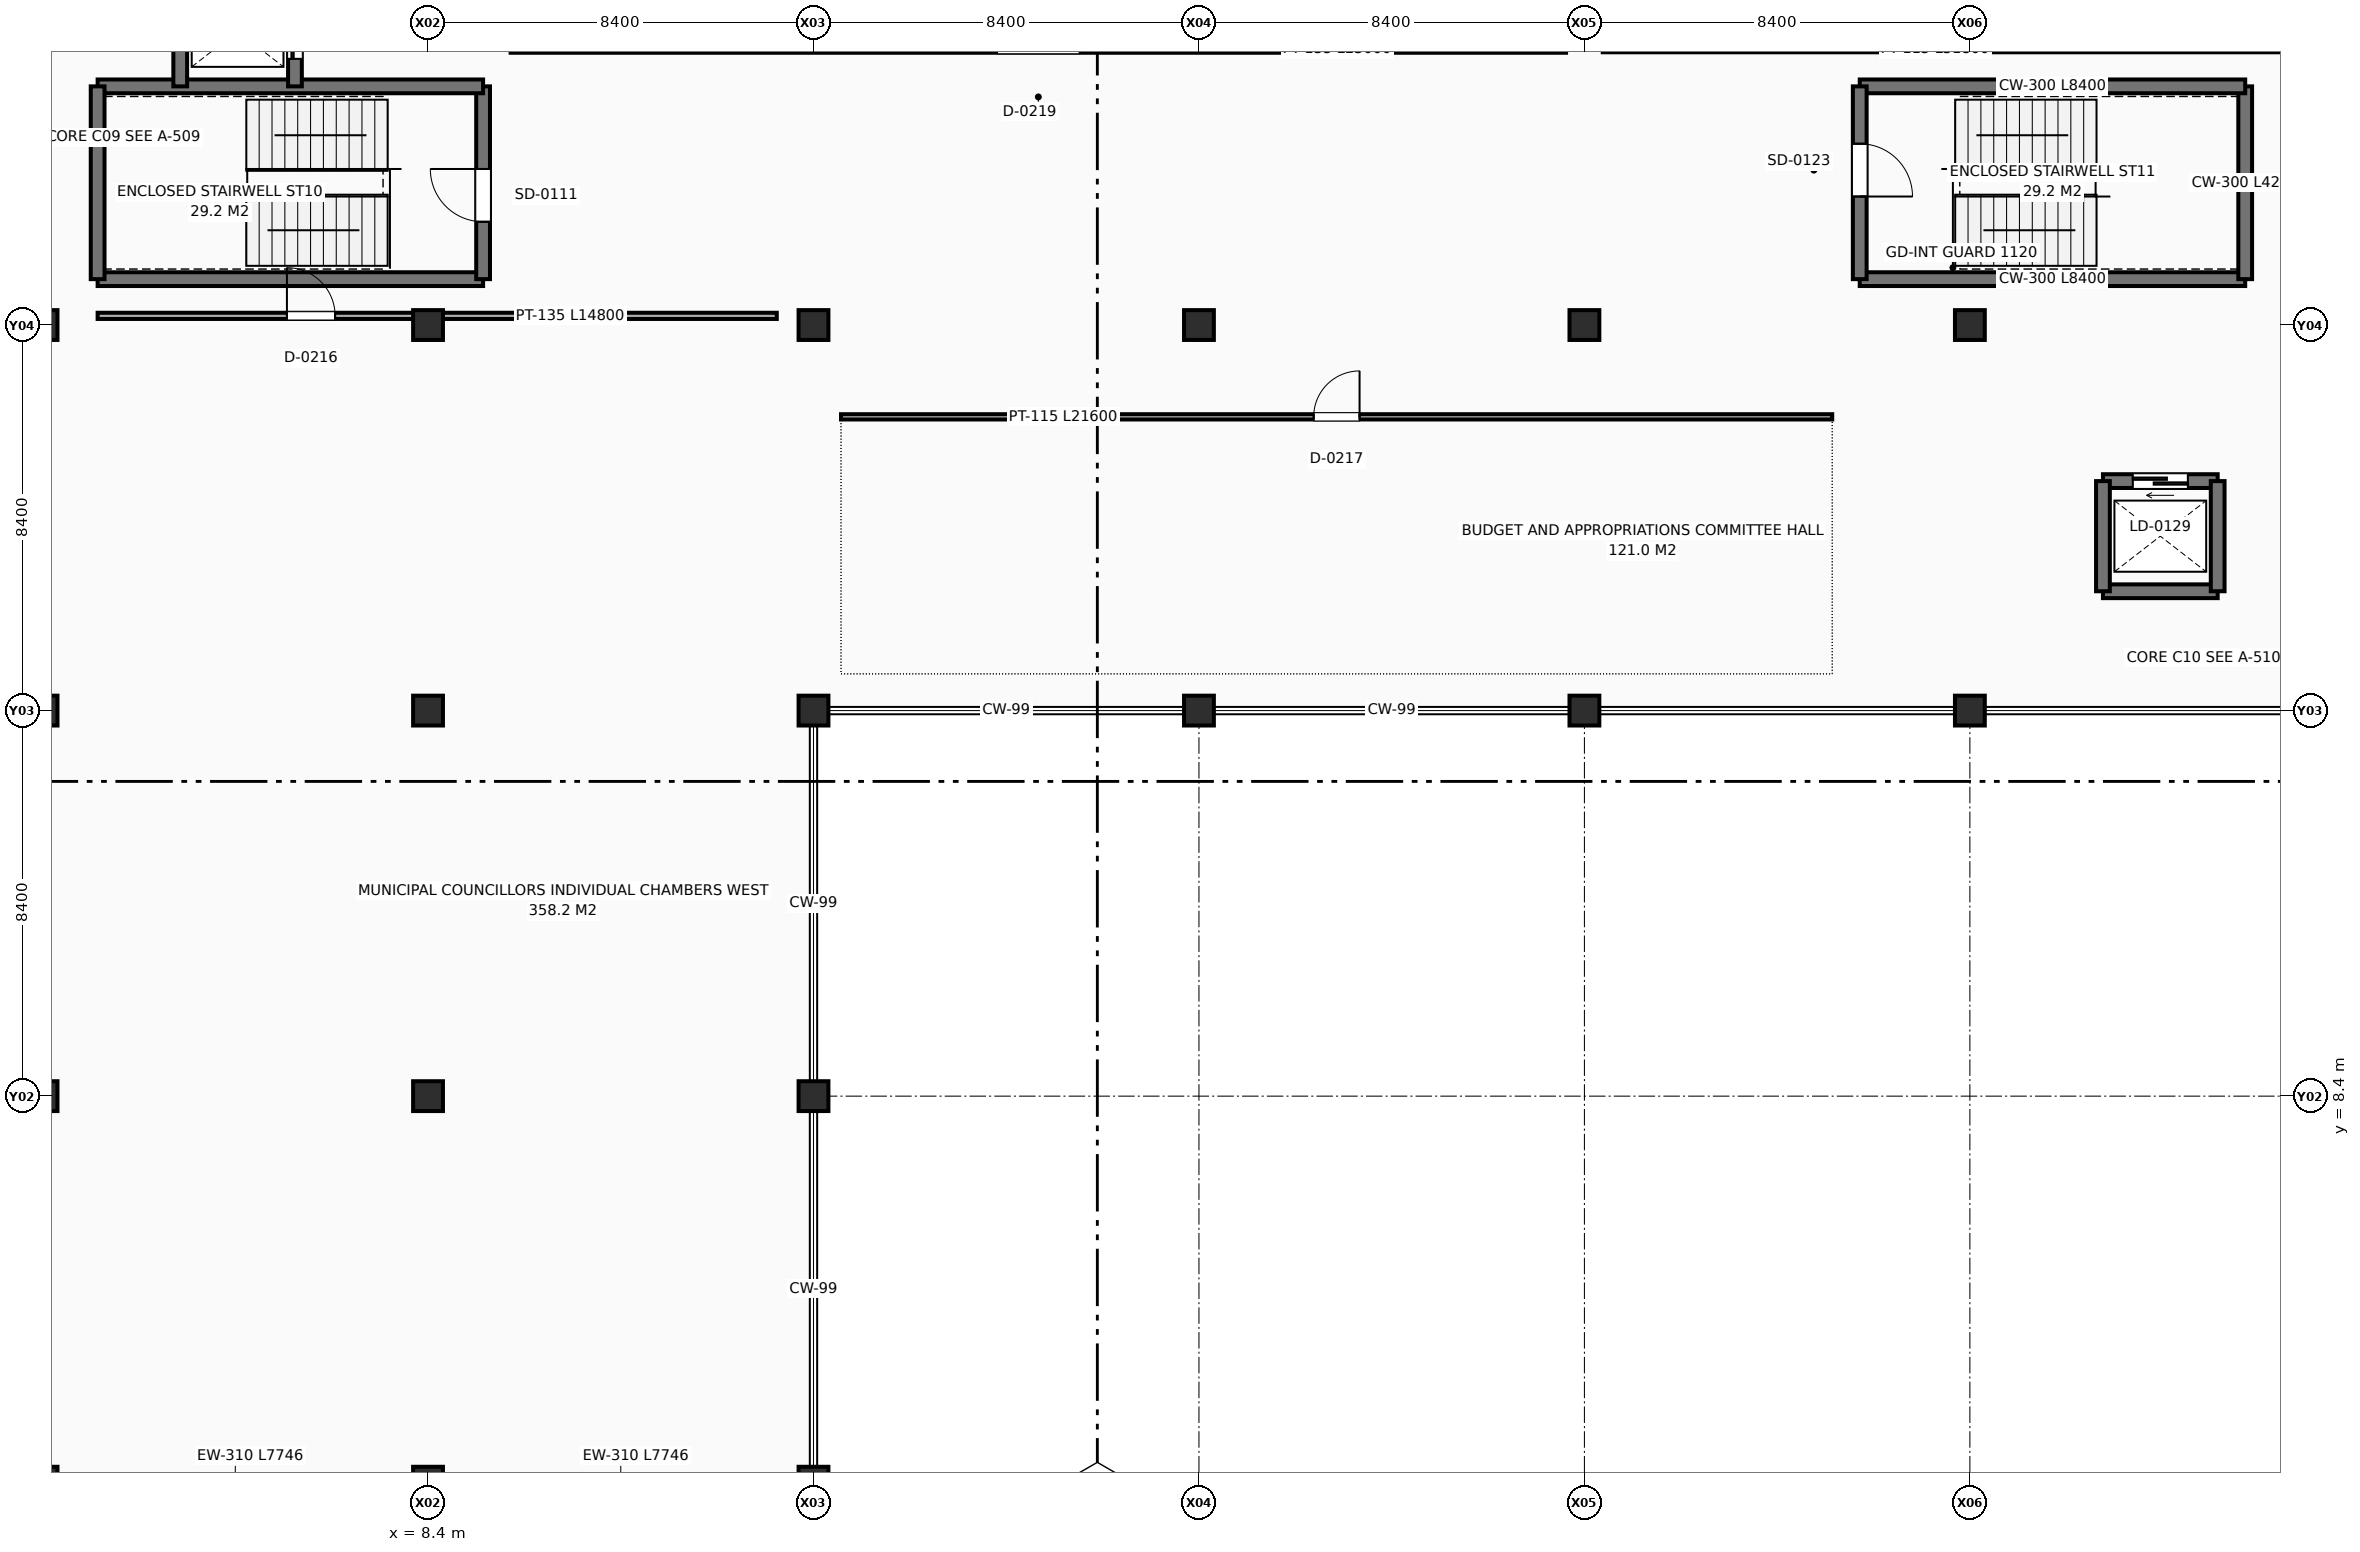
"""IFC4 building model, lengths in metres.
Left out: names, types, materials, properties, quantities, classifications, styles, units other than length and angle.
Written with IfcOpenShell. Run it as: python <this file> out.ifc"""

import sys

from ifc_helpers import new_model, si_unit, direction, frame, frame_2d, origin, origin_2d, place, context, subcontext, project, spatial, rectangle, extrude, element, fill, save


model = new_model("IFC4")
c1 = context("Model", 3, precision=1e-05, world=origin(), true_north=direction((0.0, 1.0)))
c2 = subcontext(c1, "Body", "Model", "MODEL_VIEW")
j1 = project(units=[si_unit("LENGTHUNIT", "METRE"), si_unit("PLANEANGLEUNIT", "RADIAN")], contexts=[c1])
p1 = place(None, origin())
s1 = spatial("IfcSite", under=j1, at=p1, CompositionType="ELEMENT")
p2 = place(p1, origin())
s2 = spatial("IfcBuilding", under=s1, at=p2, CompositionType="ELEMENT")
p3 = place(p2, frame((0.0, 0.0, 9.6)))
s3 = spatial("IfcBuildingStorey", under=s2, at=p3, CompositionType="ELEMENT", Elevation=9.6)
for number, where, z_axis, x_axis in (
    (1, (0.0, 0.0, 0.0), (0.0, 0.0, 1.0), (1.0, 0.0, 0.0)),
    (2, (0.0, 8.4, 0.0), (0.0, 0.0, 1.0), (1.0, 0.0, 0.0)),
    (3, (0.0, 16.8, 0.0), (0.0, 0.0, 1.0), (1.0, 0.0, 0.0)),
    (4, (0.0, 25.2, 0.0), (0.0, 0.0, 1.0), (1.0, 0.0, 0.0)),
    (5, (8.4, 0.0, 0.0), (0.0, 0.0, 1.0), (1.0, 0.0, 0.0)),
    (6, (8.4, 8.4, 0.0), (0.0, 0.0, 1.0), (1.0, 0.0, 0.0)),
    (7, (8.4, 16.8, 0.0), (0.0, 0.0, 1.0), (1.0, 0.0, 0.0)),
    (8, (8.4, 25.2, 0.0), (0.0, 0.0, 1.0), (1.0, 0.0, 0.0)),
    (9, (16.8, 0.0, 0.0), (0.0, 0.0, 1.0), (1.0, 0.0, 0.0)),
    (10, (16.8, 8.4, 0.0), (0.0, 0.0, 1.0), (1.0, 0.0, 0.0)),
    (11, (16.8, 16.8, 0.0), (0.0, 0.0, 1.0), (1.0, 0.0, 0.0)),
    (12, (16.8, 25.2, 0.0), (0.0, 0.0, 1.0), (1.0, 0.0, 0.0)),
    (13, (25.2, 16.8, 0.0), (0.0, 0.0, 1.0), (1.0, 0.0, 0.0)),
    (14, (25.2, 25.2, 0.0), (0.0, 0.0, 1.0), (1.0, 0.0, 0.0)),
    (15, (33.6, 16.8, 0.0), (0.0, 0.0, 1.0), (1.0, 0.0, 0.0)),
    (16, (33.6, 25.2, 0.0), (0.0, 0.0, 1.0), (1.0, 0.0, 0.0)),
    (17, (42.0, 16.8, 0.0), (0.0, 0.0, 1.0), (1.0, 0.0, 0.0)),
    (18, (42.0, 25.2, 0.0), (0.0, 0.0, 1.0), (1.0, 0.0, 0.0)),
):
    element("IfcColumn", number, at=place(p3, frame(where, z_axis=z_axis, x_axis=x_axis)), inside=s3, PredefinedType="COLUMN", context=c2, shape_type="SweptSolid", body=[
        extrude(rectangle(XDim=0.65, YDim=0.65, at=origin_2d()), origin(), (0.0, 0.0, 1.0), 4.2),
    ])
p4 = place(p3, frame((1.2, 26.2, 0.0), z_axis=(0.0, 0.0, 1.0), x_axis=(1.0, 0.0, 0.0)))
e19 = element("IfcWall", 19, at=p4, inside=s3, PredefinedType="SHEAR", context=c2, shape_type="SweptSolid", body=[
    extrude(rectangle(XDim=8.4, YDim=0.3, at=frame_2d((4.2, 0.0))), origin(), (0.0, 0.0, 1.0), 3.92),
])
p5 = place(p3, frame((9.6, 26.2, 0.0), z_axis=(0.0, 0.0, 1.0), x_axis=(0.0, 1.0, 0.0)))
e20 = element("IfcWall", 20, at=p5, inside=s3, PredefinedType="SHEAR", context=c2, shape_type="SweptSolid", body=[
    extrude(rectangle(XDim=4.2, YDim=0.3, at=frame_2d((2.1, 0.0))), origin(), (0.0, 0.0, 1.0), 3.92),
])
p6 = place(p5, frame((1.25, 0.0, 0.0)))
e21 = element("IfcOpeningElement", 21, at=p6, cuts=e20, PredefinedType="OPENING", context=c2, shape_type="SweptSolid", body=[
    extrude(rectangle(XDim=1.15, YDim=2.2, at=frame_2d((0.575, 1.1))), frame((0.0, 0.16, 0.0), z_axis=(0.0, -1.0, 0.0), x_axis=(1.0, 0.0, 0.0)), (0.0, 0.0, 1.0), 0.32),
])
p7 = place(p3, frame((9.6, 30.4, 0.0), z_axis=(0.0, 0.0, 1.0), x_axis=(-1.0, 0.0, 0.0)))
e22 = element("IfcWall", 22, at=p7, inside=s3, PredefinedType="SHEAR", context=c2, shape_type="SweptSolid", body=[
    extrude(rectangle(XDim=8.4, YDim=0.3, at=frame_2d((4.2, 0.0))), origin(), (0.0, 0.0, 1.0), 3.92),
])
p8 = place(p3, frame((1.2, 30.4, 0.0), z_axis=(0.0, 0.0, 1.0), x_axis=(0.0, -1.0, 0.0)))
e23 = element("IfcWall", 23, at=p8, inside=s3, PredefinedType="SHEAR", context=c2, shape_type="SweptSolid", body=[
    extrude(rectangle(XDim=4.2, YDim=0.3, at=frame_2d((2.1, 0.0))), origin(), (0.0, 0.0, 1.0), 3.92),
])
p9 = place(p3, frame((3.0, 32.8, 0.0), z_axis=(0.0, 0.0, 1.0), x_axis=(0.0, -1.0, 0.0)))
e24 = element("IfcWall", 24, at=p9, inside=s3, PredefinedType="SHEAR", context=c2, shape_type="SweptSolid", body=[
    extrude(rectangle(XDim=2.4, YDim=0.3, at=frame_2d((1.2, 0.0))), origin(), (0.0, 0.0, 1.0), 3.92),
])
p10 = place(p3, frame((5.5, 30.4, 0.0), z_axis=(0.0, 0.0, 1.0), x_axis=(0.0, 1.0, 0.0)))
e25 = element("IfcWall", 25, at=p10, inside=s3, PredefinedType="SHEAR", context=c2, shape_type="SweptSolid", body=[
    extrude(rectangle(XDim=2.4, YDim=0.3, at=frame_2d((1.2, 0.0))), origin(), (0.0, 0.0, 1.0), 3.92),
])
p11 = place(p10, frame((0.6, 0.0, 0.0)))
e26 = element("IfcOpeningElement", 26, at=p11, cuts=e25, PredefinedType="OPENING", context=c2, shape_type="SweptSolid", body=[
    extrude(rectangle(XDim=1.2, YDim=2.25, at=frame_2d((0.6, 1.125))), frame((0.0, 0.16, 0.0), z_axis=(0.0, -1.0, 0.0), x_axis=(1.0, 0.0, 0.0)), (0.0, 0.0, 1.0), 0.32),
])
p12 = place(p3, frame((39.6, 26.2, 0.0), z_axis=(0.0, 0.0, 1.0), x_axis=(1.0, 0.0, 0.0)))
e27 = element("IfcWall", 27, at=p12, inside=s3, PredefinedType="SHEAR", context=c2, shape_type="SweptSolid", body=[
    extrude(rectangle(XDim=8.4, YDim=0.3, at=frame_2d((4.2, 0.0))), origin(), (0.0, 0.0, 1.0), 3.92),
])
p13 = place(p3, frame((48.0, 26.2, 0.0), z_axis=(0.0, 0.0, 1.0), x_axis=(0.0, 1.0, 0.0)))
e28 = element("IfcWall", 28, at=p13, inside=s3, PredefinedType="SHEAR", context=c2, shape_type="SweptSolid", body=[
    extrude(rectangle(XDim=4.2, YDim=0.3, at=frame_2d((2.1, 0.0))), origin(), (0.0, 0.0, 1.0), 3.92),
])
p14 = place(p3, frame((48.0, 30.4, 0.0), z_axis=(0.0, 0.0, 1.0), x_axis=(-1.0, 0.0, 0.0)))
e29 = element("IfcWall", 29, at=p14, inside=s3, PredefinedType="SHEAR", context=c2, shape_type="SweptSolid", body=[
    extrude(rectangle(XDim=8.4, YDim=0.3, at=frame_2d((4.2, 0.0))), origin(), (0.0, 0.0, 1.0), 3.92),
])
p15 = place(p3, frame((39.6, 30.4, 0.0), z_axis=(0.0, 0.0, 1.0), x_axis=(0.0, -1.0, 0.0)))
e30 = element("IfcWall", 30, at=p15, inside=s3, PredefinedType="SHEAR", context=c2, shape_type="SweptSolid", body=[
    extrude(rectangle(XDim=4.2, YDim=0.3, at=frame_2d((2.1, 0.0))), origin(), (0.0, 0.0, 1.0), 3.92),
])
p16 = place(p15, frame((1.25, 0.0, 0.0)))
e31 = element("IfcOpeningElement", 31, at=p16, cuts=e30, PredefinedType="OPENING", context=c2, shape_type="SweptSolid", body=[
    extrude(rectangle(XDim=1.15, YDim=2.2, at=frame_2d((0.575, 1.1))), frame((0.0, 0.16, 0.0), z_axis=(0.0, -1.0, 0.0), x_axis=(1.0, 0.0, 0.0)), (0.0, 0.0, 1.0), 0.32),
])
p17 = place(p3, frame((47.4, 21.8, 0.0), z_axis=(0.0, 0.0, 1.0), x_axis=(-1.0, 0.0, 0.0)))
e32 = element("IfcWall", 32, at=p17, inside=s3, PredefinedType="SHEAR", context=c2, shape_type="SweptSolid", body=[
    extrude(rectangle(XDim=2.5, YDim=0.3, at=frame_2d((1.25, 0.0))), origin(), (0.0, 0.0, 1.0), 3.92),
])
p18 = place(p17, frame((0.65, 0.0, 0.0)))
e33 = element("IfcOpeningElement", 33, at=p18, cuts=e32, PredefinedType="OPENING", context=c2, shape_type="SweptSolid", body=[
    extrude(rectangle(XDim=1.2, YDim=2.25, at=frame_2d((0.6, 1.125))), frame((0.0, 0.16, 0.0), z_axis=(0.0, -1.0, 0.0), x_axis=(1.0, 0.0, 0.0)), (0.0, 0.0, 1.0), 0.32),
])
p19 = place(p3, frame((44.9, 19.4, 0.0), z_axis=(0.0, 0.0, 1.0), x_axis=(1.0, 0.0, 0.0)))
e34 = element("IfcWall", 34, at=p19, inside=s3, PredefinedType="SHEAR", context=c2, shape_type="SweptSolid", body=[
    extrude(rectangle(XDim=2.5, YDim=0.3, at=frame_2d((1.25, 0.0))), origin(), (0.0, 0.0, 1.0), 3.92),
])
for number, where, z_axis, x_axis in (
    (35, (44.9, 21.8, 0.0), (0.0, 0.0, 1.0), (0.0, -1.0, 0.0)),
    (36, (47.4, 19.4, 0.0), (0.0, 0.0, 1.0), (0.0, 1.0, 0.0)),
):
    element("IfcWall", number, at=place(p3, frame(where, z_axis=z_axis, x_axis=x_axis)), inside=s3, PredefinedType="SHEAR", context=c2, shape_type="SweptSolid", body=[
        extrude(rectangle(XDim=2.4, YDim=0.3, at=frame_2d((1.2, 0.0))), origin(), (0.0, 0.0, 1.0), 3.92),
    ])
p20 = place(p3, frame((1.2, 25.4, 0.0), z_axis=(0.0, 0.0, 1.0), x_axis=(1.0, 0.0, 0.0)))
e37 = element("IfcWall", 37, at=p20, inside=s3, PredefinedType="PARTITIONING", context=c2, shape_type="SweptSolid", body=[
    extrude(rectangle(XDim=14.8, YDim=0.135, at=frame_2d((7.4, 0.0))), origin(), (0.0, 0.0, 1.0), 3.29),
])
p21 = place(p20, frame((4.125, 0.0, 0.0)))
e38 = element("IfcOpeningElement", 38, at=p21, cuts=e37, PredefinedType="OPENING", context=c2, shape_type="SweptSolid", body=[
    extrude(rectangle(XDim=1.05, YDim=2.15, at=frame_2d((0.525, 1.075))), frame((0.0, 0.077, 0.0), z_axis=(0.0, -1.0, 0.0), x_axis=(1.0, 0.0, 0.0)), (0.0, 0.0, 1.0), 0.155),
])
p22 = place(p3, frame((17.4, 23.2, 0.0), z_axis=(0.0, 0.0, 1.0), x_axis=(1.0, 0.0, 0.0)))
e39 = element("IfcWall", 39, at=p22, inside=s3, PredefinedType="PARTITIONING", context=c2, shape_type="SweptSolid", body=[
    extrude(rectangle(XDim=21.6, YDim=0.115, at=frame_2d((10.8, 0.0))), origin(), (0.0, 0.0, 1.0), 3.86),
])
p23 = place(p22, frame((10.3, 0.0, 0.0)))
e40 = element("IfcOpeningElement", 40, at=p23, cuts=e39, PredefinedType="OPENING", context=c2, shape_type="SweptSolid", body=[
    extrude(rectangle(XDim=1.0, YDim=2.1, at=frame_2d((0.5, 1.05))), frame((0.0, 0.067, 0.0), z_axis=(0.0, -1.0, 0.0), x_axis=(1.0, 0.0, 0.0)), (0.0, 0.0, 1.0), 0.135),
])
p24 = place(p3, frame((10.2, 31.2, 0.0), z_axis=(0.0, 0.0, 1.0), x_axis=(1.0, 0.0, 0.0)))
e41 = element("IfcWall", 41, at=p24, inside=s3, PredefinedType="PARTITIONING", context=c2, shape_type="SweptSolid", body=[
    extrude(rectangle(XDim=23.0, YDim=0.135, at=frame_2d((11.5, 0.0))), origin(), (0.0, 0.0, 1.0), 3.86),
])
p25 = place(p24, frame((10.6, 0.0, 0.0)))
e42 = element("IfcOpeningElement", 42, at=p25, cuts=e41, PredefinedType="OPENING", context=c2, shape_type="SweptSolid", body=[
    extrude(rectangle(XDim=1.8, YDim=2.4, at=frame_2d((0.9, 1.2))), frame((0.0, 0.077, 0.0), z_axis=(0.0, -1.0, 0.0), x_axis=(1.0, 0.0, 0.0)), (0.0, 0.0, 1.0), 0.155),
])
p26 = place(p3, frame((34.0, 31.2, 0.0), z_axis=(0.0, 0.0, 1.0), x_axis=(1.0, 0.0, 0.0)))
e43 = element("IfcWall", 43, at=p26, inside=s3, PredefinedType="PARTITIONING", context=c2, shape_type="SweptSolid", body=[
    extrude(rectangle(XDim=31.8, YDim=0.115, at=frame_2d((15.9, 0.0))), origin(), (0.0, 0.0, 1.0), 3.86),
])
p27 = place(p26, frame((15.1, 0.0, 0.0)))
e44 = element("IfcOpeningElement", 44, at=p27, cuts=e43, PredefinedType="OPENING", context=c2, shape_type="SweptSolid", body=[
    extrude(rectangle(XDim=1.6, YDim=2.3, at=frame_2d((0.8, 1.15))), frame((0.0, 0.067, 0.0), z_axis=(0.0, -1.0, 0.0), x_axis=(1.0, 0.0, 0.0)), (0.0, 0.0, 1.0), 0.135),
])
p28 = place(p6, origin())
e45 = element("IfcDoor", 45, at=p28, inside=s3, OperationType="SINGLE_SWING_RIGHT", PredefinedType="DOOR", context=c2, shape_type="SweptSolid", body=[
    extrude(rectangle(XDim=1.15, YDim=2.2, at=frame_2d((0.575, 1.1))), frame((0.0, 0.025, 0.0), z_axis=(0.0, -1.0, 0.0), x_axis=(1.0, 0.0, 0.0)), (0.0, 0.0, 1.0), 0.05),
])
fill(e21, e45)
p29 = place(p11, origin())
e46 = element("IfcDoor", 46, at=p29, inside=s3, OperationType="SLIDING_TO_LEFT", PredefinedType="DOOR", context=c2, shape_type="SweptSolid", body=[
    extrude(rectangle(XDim=1.2, YDim=2.25, at=frame_2d((0.6, 1.125))), frame((0.0, 0.025, 0.0), z_axis=(0.0, -1.0, 0.0), x_axis=(1.0, 0.0, 0.0)), (0.0, 0.0, 1.0), 0.05),
])
fill(e26, e46)
p30 = place(p16, origin())
e47 = element("IfcDoor", 47, at=p30, inside=s3, OperationType="SINGLE_SWING_RIGHT", PredefinedType="DOOR", context=c2, shape_type="SweptSolid", body=[
    extrude(rectangle(XDim=1.15, YDim=2.2, at=frame_2d((0.575, 1.1))), frame((0.0, 0.025, 0.0), z_axis=(0.0, -1.0, 0.0), x_axis=(1.0, 0.0, 0.0)), (0.0, 0.0, 1.0), 0.05),
])
fill(e31, e47)
p31 = place(p18, origin())
e48 = element("IfcDoor", 48, at=p31, inside=s3, OperationType="SLIDING_TO_LEFT", PredefinedType="DOOR", context=c2, shape_type="SweptSolid", body=[
    extrude(rectangle(XDim=1.2, YDim=2.25, at=frame_2d((0.6, 1.125))), frame((0.0, 0.025, 0.0), z_axis=(0.0, -1.0, 0.0), x_axis=(1.0, 0.0, 0.0)), (0.0, 0.0, 1.0), 0.05),
])
fill(e33, e48)
p32 = place(p21, origin())
e49 = element("IfcDoor", 49, at=p32, inside=s3, OperationType="SINGLE_SWING_LEFT", PredefinedType="DOOR", context=c2, shape_type="SweptSolid", body=[
    extrude(rectangle(XDim=1.05, YDim=2.15, at=frame_2d((0.525, 1.075))), frame((0.0, 0.025, 0.0), z_axis=(0.0, -1.0, 0.0), x_axis=(1.0, 0.0, 0.0)), (0.0, 0.0, 1.0), 0.05),
])
fill(e38, e49)
p33 = place(p23, origin())
e50 = element("IfcDoor", 50, at=p33, inside=s3, OperationType="SINGLE_SWING_RIGHT", PredefinedType="DOOR", context=c2, shape_type="SweptSolid", body=[
    extrude(rectangle(XDim=1.0, YDim=2.1, at=frame_2d((0.5, 1.05))), frame((0.0, 0.025, 0.0), z_axis=(0.0, -1.0, 0.0), x_axis=(1.0, 0.0, 0.0)), (0.0, 0.0, 1.0), 0.05),
])
fill(e40, e50)
save(model, sys.argv[1])
